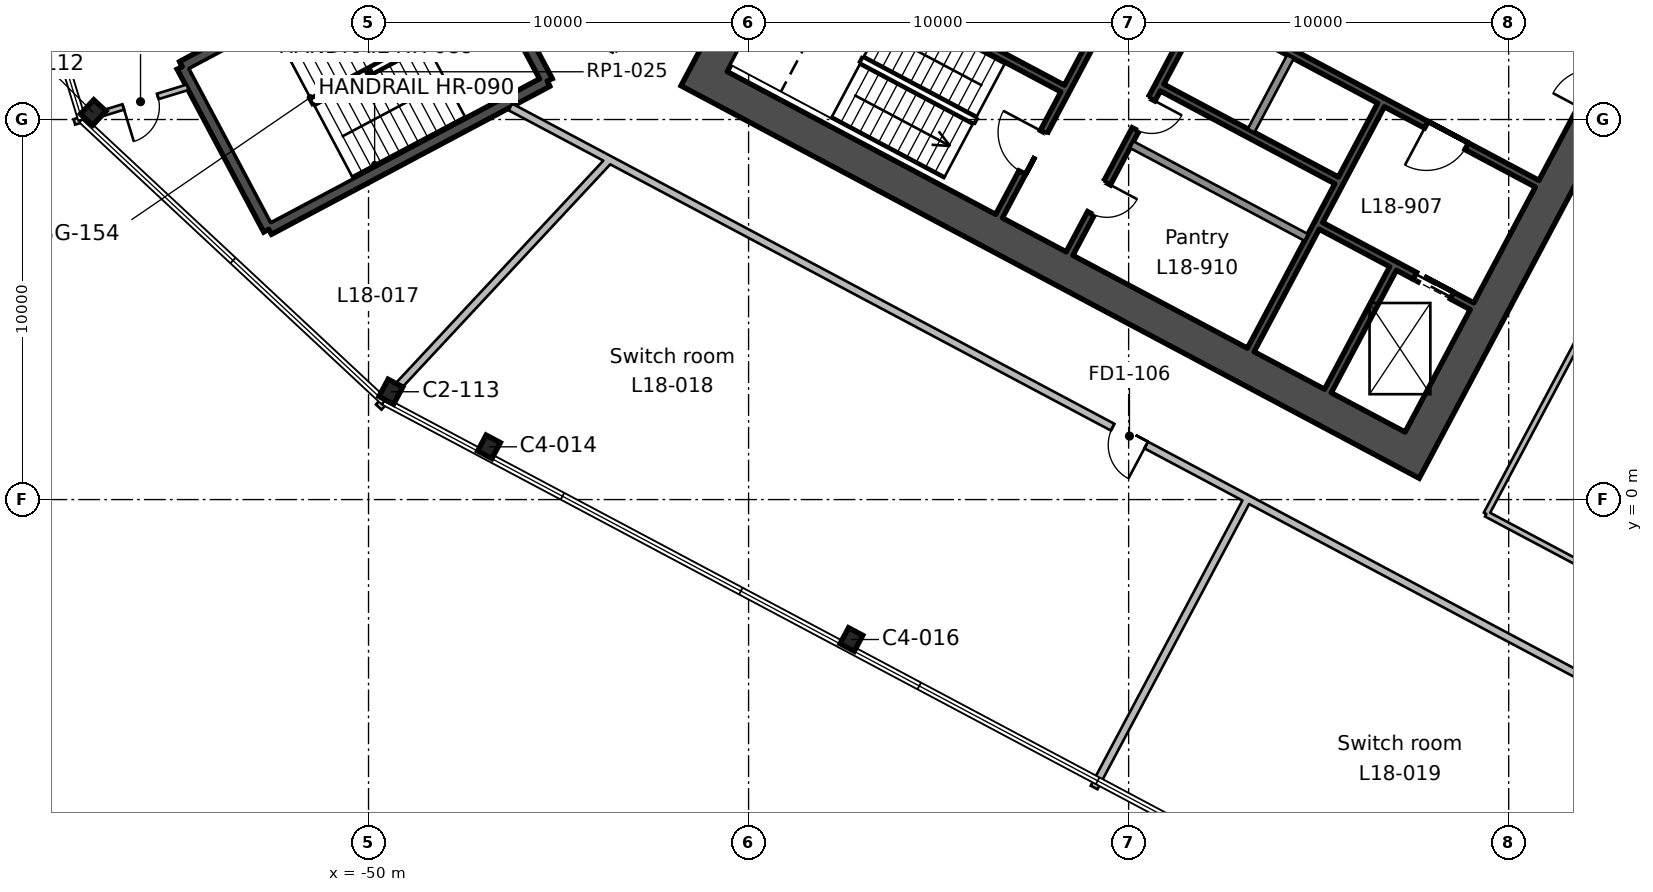
"""IFC4 building model, lengths in metres.
Left out: names, types, materials, properties, quantities, classifications, styles, units other than length and angle.
Written with IfcOpenShell. Run it as: python <this file> out.ifc"""

import sys

from ifc_helpers import new_model, si_unit, direction, frame, frame_2d, origin, origin_2d, place, context, subcontext, project, spatial, rectangle, i_section, extrude, element, fill, save


model = new_model("IFC4")
c1 = context("Model", 3, precision=1e-05, world=origin(), true_north=direction((0.0, 1.0)))
c2 = subcontext(c1, "Body", "Model", "MODEL_VIEW")
j1 = project(units=[si_unit("LENGTHUNIT", "METRE"), si_unit("PLANEANGLEUNIT", "RADIAN")], contexts=[c1])
p1 = place(None, origin())
s1 = spatial("IfcSite", under=j1, at=p1, CompositionType="ELEMENT")
p2 = place(p1, origin())
s2 = spatial("IfcBuilding", under=s1, at=p2, CompositionType="ELEMENT")
p3 = place(p2, frame((0.0, 0.0, 93.8)))
s3 = spatial("IfcBuildingStorey", under=s2, at=p3, CompositionType="ELEMENT", Elevation=93.8)
for number, where, z_axis, x_axis in (
    (1, (-37.294, -3.682, 0.0), (0.0, 0.0, 1.0), (0.883, -0.469, 0.0)),
    (2, (-46.83, 1.388, 0.0), (0.0, 0.0, 1.0), (0.883, -0.469, 0.0)),
):
    element("IfcColumn", number, at=place(p3, frame(where, z_axis=z_axis, x_axis=x_axis)), inside=s3, PredefinedType="COLUMN", context=c2, shape_type="SweptSolid", body=[
        extrude(i_section(OverallWidth=0.424, OverallDepth=0.475, WebThickness=0.048, FlangeThickness=0.077, FilletRadius=0.015, at=origin_2d()), origin(), (0.0, 0.0, 1.0), 4.6),
    ])
for number, where, z_axis, x_axis in (
    (3, (-49.412, 2.837, 0.0), (0.0, 0.0, 1.0), (0.883, -0.469, 0.0)),
    (4, (-57.245, 10.183, 0.0), (0.0, 0.0, 1.0), (0.731, -0.682, 0.0)),
):
    element("IfcColumn", number, at=place(p3, frame(where, z_axis=z_axis, x_axis=x_axis)), inside=s3, PredefinedType="COLUMN", context=c2, shape_type="SweptSolid", body=[
        extrude(i_section(OverallWidth=0.437, OverallDepth=0.513, WebThickness=0.061, FlangeThickness=0.097, FilletRadius=0.015, at=origin_2d()), origin(), (0.0, 0.0, 1.0), 4.6),
    ])
p4 = place(p3, frame((-13.362, 18.43, 0.0), z_axis=(0.0, 0.0, 1.0), x_axis=(-0.46947084998, -0.882947971864, 0.0)))
e5 = element("IfcWall", 5, at=p4, inside=s3, PredefinedType="SHEAR", context=c2, shape_type="SweptSolid", body=[
    extrude(rectangle(XDim=20.0, YDim=0.9, at=frame_2d((10.0, 0.0))), origin(), (0.0, 0.0, 1.0), 4.6),
])
p5 = place(p4, frame((7.0, 0.0, 0.0)))
e6 = element("IfcOpeningElement", 6, at=p5, cuts=e5, PredefinedType="OPENING", context=c2, shape_type="SweptSolid", body=[
    extrude(rectangle(XDim=2.4, YDim=2.4, at=frame_2d((1.2, 1.2))), frame((0.0, 0.46, 0.0), z_axis=(0.0, -1.0, 0.0), x_axis=(1.0, 0.0, 0.0)), (0.0, 0.0, 1.0), 0.92),
])
p6 = place(p3, frame((-31.992, 28.336, 0.0), z_axis=(0.0, 0.0, 1.0), x_axis=(-0.46947084998, -0.882947971864, 0.0)))
e7 = element("IfcWall", 7, at=p6, inside=s3, PredefinedType="SHEAR", context=c2, shape_type="SweptSolid", body=[
    extrude(rectangle(XDim=20.0, YDim=0.9, at=frame_2d((10.0, 0.0))), origin(), (0.0, 0.0, 1.0), 4.6),
])
p7 = place(p6, frame((10.6, 0.0, 0.0)))
e8 = element("IfcOpeningElement", 8, at=p7, cuts=e7, PredefinedType="OPENING", context=c2, shape_type="SweptSolid", body=[
    extrude(rectangle(XDim=2.4, YDim=2.4, at=frame_2d((1.2, 1.2))), frame((0.0, 0.46, 0.0), z_axis=(0.0, -1.0, 0.0), x_axis=(1.0, 0.0, 0.0)), (0.0, 0.0, 1.0), 0.92),
])
p8 = place(p3, frame((-22.937, 1.38, 0.0), z_axis=(0.0, 0.0, 1.0), x_axis=(-0.88295276571, 0.46946183394, 0.0)))
e9 = element("IfcWall", 9, at=p8, inside=s3, PredefinedType="SHEAR", context=c2, shape_type="SweptSolid", body=[
    extrude(rectangle(XDim=20.2, YDim=0.9, at=frame_2d((10.1, 0.0))), origin(), (0.0, 0.0, 1.0), 4.6),
])
p9 = place(p3, frame((-23.043, 6.08, 0.0), z_axis=(0.0, 0.0, 1.0), x_axis=(-0.469494272526, -0.882935517501, 0.0)))
e10 = element("IfcWall", 10, at=p9, inside=s3, PredefinedType="SHEAR", context=c2, shape_type="SweptSolid", body=[
    extrude(rectangle(XDim=3.65, YDim=0.2, at=frame_2d((1.825, 0.0))), origin(), (0.0, 0.0, 1.0), 4.6),
])
p10 = place(p3, frame((-23.36, 10.382, 0.0), z_axis=(0.0, 0.0, 1.0), x_axis=(-0.469480409012, -0.88294288918, 0.0)))
e11 = element("IfcWall", 11, at=p10, inside=s3, PredefinedType="SHEAR", context=c2, shape_type="SweptSolid", body=[
    extrude(rectangle(XDim=7.3, YDim=0.2, at=frame_2d((3.65, 0.0))), origin(), (0.0, 0.0, 1.0), 4.6),
])
p11 = place(p3, frame((-25.744, 11.65, 0.0), z_axis=(0.0, 0.0, 1.0), x_axis=(-0.469487830541, -0.882938942948, 0.0)))
e12 = element("IfcWall", 12, at=p11, inside=s3, PredefinedType="SOLIDWALL", context=c2, shape_type="SweptSolid", body=[
    extrude(rectangle(XDim=2.2, YDim=0.2, at=frame_2d((1.1, 0.0))), origin(), (0.0, 0.0, 1.0), 4.6),
])
p12 = place(p3, frame((-28.128, 12.917, 0.0), z_axis=(0.0, 0.0, 1.0), x_axis=(-0.469454336211, -0.882956752176, 0.0)))
e13 = element("IfcWall", 13, at=p12, inside=s3, PredefinedType="SHEAR", context=c2, shape_type="SweptSolid", body=[
    extrude(rectangle(XDim=7.3, YDim=0.2, at=frame_2d((3.65, 0.0))), origin(), (0.0, 0.0, 1.0), 4.6),
])
p13 = place(p12, frame((2.7, 0.0, 0.0)))
e14 = element("IfcOpeningElement", 14, at=p13, cuts=e13, PredefinedType="OPENING", context=c2, shape_type="SweptSolid", body=[
    extrude(rectangle(XDim=0.9, YDim=2.1, at=frame_2d((0.45, 1.05))), frame((0.0, 0.11, 0.0), z_axis=(0.0, -1.0, 0.0), x_axis=(1.0, 0.0, 0.0)), (0.0, 0.0, 1.0), 0.22),
])
p14 = place(p12, frame((5.2, 0.0, 0.0)))
e15 = element("IfcOpeningElement", 15, at=p14, cuts=e13, PredefinedType="OPENING", context=c2, shape_type="SweptSolid", body=[
    extrude(rectangle(XDim=0.9, YDim=2.1, at=frame_2d((0.45, 1.05))), frame((0.0, 0.11, 0.0), z_axis=(0.0, -1.0, 0.0), x_axis=(1.0, 0.0, 0.0)), (0.0, 0.0, 1.0), 0.22),
])
p15 = place(p3, frame((-29.982, 13.903, 0.0), z_axis=(0.0, 0.0, 1.0), x_axis=(-0.469454336211, -0.882956752176, 0.0)))
e16 = element("IfcWall", 16, at=p15, inside=s3, PredefinedType="SHEAR", context=c2, shape_type="SweptSolid", body=[
    extrude(rectangle(XDim=7.3, YDim=0.2, at=frame_2d((3.65, 0.0))), origin(), (0.0, 0.0, 1.0), 4.6),
])
p16 = place(p15, frame((4.8, 0.0, 0.0)))
e17 = element("IfcOpeningElement", 17, at=p16, cuts=e16, PredefinedType="OPENING", context=c2, shape_type="SweptSolid", body=[
    extrude(rectangle(XDim=1.2, YDim=2.1, at=frame_2d((0.6, 1.05))), frame((0.0, 0.11, 0.0), z_axis=(0.0, -1.0, 0.0), x_axis=(1.0, 0.0, 0.0)), (0.0, 0.0, 1.0), 0.22),
])
p17 = place(p3, frame((-19.252, 8.311, 0.0), z_axis=(0.0, 0.0, 1.0), x_axis=(-0.882955722218, 0.469456273365, 0.0)))
e18 = element("IfcWall", 18, at=p17, inside=s3, PredefinedType="SHEAR", context=c2, shape_type="SweptSolid", body=[
    extrude(rectangle(XDim=10.0, YDim=0.2, at=frame_2d((5.0, 0.0))), origin(), (0.0, 0.0, 1.0), 4.6),
])
p18 = place(p17, frame((2.1, 0.0, 0.0)))
e19 = element("IfcOpeningElement", 19, at=p18, cuts=e18, PredefinedType="OPENING", context=c2, shape_type="SweptSolid", body=[
    extrude(rectangle(XDim=1.2, YDim=2.1, at=frame_2d((0.6, 1.05))), frame((0.0, 0.11, 0.0), z_axis=(0.0, -1.0, 0.0), x_axis=(1.0, 0.0, 0.0)), (0.0, 0.0, 1.0), 0.22),
])
p19 = place(p3, frame((-24.528, 8.398, 0.0), z_axis=(0.0, 0.0, 1.0), x_axis=(-0.882953967957, 0.469459572775, 0.0)))
e20 = element("IfcWall", 20, at=p19, inside=s3, PredefinedType="SHEAR", context=c2, shape_type="SweptSolid", body=[
    extrude(rectangle(XDim=5.2, YDim=0.2, at=frame_2d((2.6, 0.0))), origin(), (0.0, 0.0, 1.0), 4.6),
])
p20 = place(p3, frame((-20.965, 5.088, 0.0), z_axis=(0.0, 0.0, 1.0), x_axis=(-0.882925986334, 0.469512196493, 0.0)))
e21 = element("IfcWall", 21, at=p20, inside=s3, PredefinedType="SHEAR", context=c2, shape_type="SweptSolid", body=[
    extrude(rectangle(XDim=4.5, YDim=0.2, at=frame_2d((2.25, 0.0))), origin(), (0.0, 0.0, 1.0), 4.6),
])
p21 = place(p20, frame((0.6, 0.0, 0.0)))
e22 = element("IfcOpeningElement", 22, at=p21, cuts=e21, PredefinedType="OPENING", context=c2, shape_type="SweptSolid", body=[
    extrude(rectangle(XDim=1.1, YDim=2.1, at=frame_2d((0.55, 1.05))), frame((0.0, 0.11, 0.0), z_axis=(0.0, -1.0, 0.0), x_axis=(1.0, 0.0, 0.0)), (0.0, 0.0, 1.0), 0.22),
])
p22 = place(p3, frame((-31.737, 10.816, 0.0), z_axis=(0.0, 0.0, 1.0), x_axis=(-0.882940221191, 0.469485426614, 0.0)))
e23 = element("IfcWall", 23, at=p22, inside=s3, PredefinedType="SHEAR", context=c2, shape_type="SweptSolid", body=[
    extrude(rectangle(XDim=8.0, YDim=0.2, at=frame_2d((4.0, 0.0))), origin(), (0.0, 0.0, 1.0), 4.6),
])
p23 = place(p3, frame((-25.326, 6.897, 0.0), z_axis=(0.0, 0.0, 1.0), x_axis=(-0.882953967957, 0.469459572775, 0.0)))
e24 = element("IfcWall", 24, at=p23, inside=s3, PredefinedType="SOLIDWALL", context=c2, shape_type="SweptSolid", body=[
    extrude(rectangle(XDim=5.2, YDim=0.2, at=frame_2d((2.6, 0.0))), origin(), (0.0, 0.0, 1.0), 4.6),
])
p24 = place(p3, frame((-47.574, 15.29, 0.0), z_axis=(0.0, 0.0, 1.0), x_axis=(0.469443498566, -0.882962514297, 0.0)))
e25 = element("IfcWall", 25, at=p24, inside=s3, PredefinedType="SHEAR", context=c2, shape_type="SweptSolid", body=[
    extrude(rectangle(XDim=4.85, YDim=0.3, at=frame_2d((2.425, 0.0))), origin(), (0.0, 0.0, 1.0), 4.6),
])
p25 = place(p3, frame((-45.297, 11.007, 0.0), z_axis=(0.0, 0.0, 1.0), x_axis=(-0.882951519127, -0.469464178475, 0.0)))
e26 = element("IfcWall", 26, at=p25, inside=s3, PredefinedType="SHEAR", context=c2, shape_type="SweptSolid", body=[
    extrude(rectangle(XDim=8.3, YDim=0.3, at=frame_2d((4.15, 0.0))), origin(), (0.0, 0.0, 1.0), 4.6),
])
p26 = place(p3, frame((-52.626, 7.111, 0.0), z_axis=(0.0, 0.0, 1.0), x_axis=(-0.469464364128, 0.882951420416, 0.0)))
e27 = element("IfcWall", 27, at=p26, inside=s3, PredefinedType="SHEAR", context=c2, shape_type="SweptSolid", body=[
    extrude(rectangle(XDim=4.85, YDim=0.3, at=frame_2d((2.425, 0.0))), origin(), (0.0, 0.0, 1.0), 4.6),
])
p27 = place(p3, frame((-54.903, 11.393, 0.0), z_axis=(0.0, 0.0, 1.0), x_axis=(0.882939326045, 0.469487110071, 0.0)))
e28 = element("IfcWall", 28, at=p27, inside=s3, PredefinedType="SHEAR", context=c2, shape_type="SweptSolid", body=[
    extrude(rectangle(XDim=8.3, YDim=0.3, at=frame_2d((4.15, 0.0))), origin(), (0.0, 0.0, 1.0), 4.6),
])
p28 = place(p27, frame((6.05, 0.0, 0.0)))
e29 = element("IfcOpeningElement", 29, at=p28, cuts=e28, PredefinedType="OPENING", context=c2, shape_type="SweptSolid", body=[
    extrude(rectangle(XDim=1.9, YDim=2.1, at=frame_2d((0.95, 1.05))), frame((0.0, 0.16, 0.0), z_axis=(0.0, -1.0, 0.0), x_axis=(1.0, 0.0, 0.0)), (0.0, 0.0, 1.0), 0.32),
])
p29 = place(p3, frame((-54.761, 10.848, 0.0), z_axis=(0.0, 0.0, 1.0), x_axis=(-0.956301064033, -0.29238378021, 0.0)))
e30 = element("IfcWall", 30, at=p29, inside=s3, PredefinedType="PARTITIONING", context=c2, shape_type="SweptSolid", body=[
    extrude(rectangle(XDim=3.115, YDim=0.15, at=frame_2d((1.558, 0.0))), origin(), (0.0, 0.0, 1.0), 4.2),
])
p30 = place(p29, frame((0.82, 0.0, 0.0)))
e31 = element("IfcOpeningElement", 31, at=p30, cuts=e30, PredefinedType="OPENING", context=c2, shape_type="SweptSolid", body=[
    extrude(rectangle(XDim=0.95, YDim=2.1, at=frame_2d((0.475, 1.05))), frame((0.0, 0.085, 0.0), z_axis=(0.0, -1.0, 0.0), x_axis=(1.0, 0.0, 0.0)), (0.0, 0.0, 1.0), 0.17),
])
p31 = place(p3, frame((-43.661, 8.944, 0.0), z_axis=(0.0, 0.0, 1.0), x_axis=(-0.682024103878, -0.731329694276, 0.0)))
e32 = element("IfcWall", 32, at=p31, inside=s3, PredefinedType="PARTITIONING", context=c2, shape_type="SweptSolid", body=[
    extrude(rectangle(XDim=8.903, YDim=0.2, at=frame_2d((4.451, 0.0))), origin(), (0.0, 0.0, 1.0), 4.2),
])
p32 = place(p3, frame((-26.871, 0.017, 0.0), z_axis=(0.0, 0.0, 1.0), x_axis=(-0.469522575087, -0.882920467247, 0.0)))
e33 = element("IfcWall", 33, at=p32, inside=s3, PredefinedType="PARTITIONING", context=c2, shape_type="SweptSolid", body=[
    extrude(rectangle(XDim=8.6, YDim=0.2, at=frame_2d((4.3, 0.0))), origin(), (0.0, 0.0, 1.0), 4.2),
])
p33 = place(p3, frame((-43.544, 11.827, 0.0), z_axis=(0.0, 0.0, 1.0), x_axis=(-0.88289413979, 0.469572079584, 0.0)))
e34 = element("IfcWall", 34, at=p33, inside=s3, PredefinedType="PARTITIONING", context=c2, shape_type="SweptSolid", body=[
    extrude(rectangle(XDim=3.168, YDim=0.15, at=frame_2d((1.584, 0.0))), origin(), (0.0, 0.0, 1.0), 4.2),
])
p34 = place(p3, frame((-13.6, -7.039, 0.0), z_axis=(0.0, 0.0, 1.0), x_axis=(-0.882948807105, 0.469469279113, 0.0)))
e35 = element("IfcWall", 35, at=p34, inside=s3, PredefinedType="PARTITIONING", context=c2, shape_type="SweptSolid", body=[
    extrude(rectangle(XDim=36.999, YDim=0.2, at=frame_2d((18.499, 0.0))), origin(), (0.0, 0.0, 1.0), 4.2),
])
p35 = place(p34, frame((18.05, 0.0, 0.0)))
e36 = element("IfcOpeningElement", 36, at=p35, cuts=e35, PredefinedType="OPENING", context=c2, shape_type="SweptSolid", body=[
    extrude(rectangle(XDim=1.0, YDim=2.1, at=frame_2d((0.5, 1.05))), frame((0.0, 0.11, 0.0), z_axis=(0.0, -1.0, 0.0), x_axis=(1.0, 0.0, 0.0)), (0.0, 0.0, 1.0), 0.22),
])
p36 = place(p3, frame((-20.588, -0.379, 0.0), z_axis=(0.0, 0.0, 1.0), x_axis=(0.469489882812, 0.882937851685, 0.0)))
e37 = element("IfcWall", 37, at=p36, inside=s3, PredefinedType="PARTITIONING", context=c2, shape_type="SweptSolid", body=[
    extrude(rectangle(XDim=20.0, YDim=0.15, at=frame_2d((10.0, 0.0))), origin(), (0.0, 0.0, 1.0), 4.2),
])
p37 = place(p36, frame((9.55, 0.0, 0.0)))
e38 = element("IfcOpeningElement", 38, at=p37, cuts=e37, PredefinedType="OPENING", context=c2, shape_type="SweptSolid", body=[
    extrude(rectangle(XDim=1.0, YDim=2.1, at=frame_2d((0.5, 1.05))), frame((0.0, 0.085, 0.0), z_axis=(0.0, -1.0, 0.0), x_axis=(1.0, 0.0, 0.0)), (0.0, 0.0, 1.0), 0.17),
])
p38 = place(p3, frame((-13.6, -4.094, 0.0), z_axis=(0.0, 0.0, 1.0), x_axis=(-0.882967890474, 0.469433386533, 0.0)))
e39 = element("IfcWall", 39, at=p38, inside=s3, PredefinedType="PARTITIONING", context=c2, shape_type="SweptSolid", body=[
    extrude(rectangle(XDim=7.914, YDim=0.15, at=frame_2d((3.957, 0.0))), origin(), (0.0, 0.0, 1.0), 4.2),
])
p39 = place(p18, origin())
e40 = element("IfcDoor", 40, at=p39, inside=s3, OperationType="SINGLE_SWING_RIGHT", PredefinedType="DOOR", context=c2, shape_type="SweptSolid", body=[
    extrude(rectangle(XDim=1.2, YDim=2.1, at=frame_2d((0.6, 1.05))), frame((0.0, 0.025, 0.0), z_axis=(0.0, -1.0, 0.0), x_axis=(1.0, 0.0, 0.0)), (0.0, 0.0, 1.0), 0.05),
])
fill(e19, e40)
p40 = place(p16, frame((1.2, 0.0, 0.0), z_axis=(0.0, 0.0, 1.0), x_axis=(-1.0, 0.0, 0.0)))
e41 = element("IfcDoor", 41, at=p40, inside=s3, OperationType="SINGLE_SWING_RIGHT", PredefinedType="DOOR", context=c2, shape_type="SweptSolid", body=[
    extrude(rectangle(XDim=1.2, YDim=2.1, at=frame_2d((0.6, 1.05))), frame((0.0, 0.025, 0.0), z_axis=(0.0, -1.0, 0.0), x_axis=(1.0, 0.0, 0.0)), (0.0, 0.0, 1.0), 0.05),
])
fill(e17, e41)
p41 = place(p21, origin())
e42 = element("IfcDoor", 42, at=p41, inside=s3, OperationType="DOUBLE_DOOR_SLIDING", PredefinedType="DOOR", context=c2, shape_type="SweptSolid", body=[
    extrude(rectangle(XDim=1.1, YDim=2.1, at=frame_2d((0.55, 1.05))), frame((0.0, 0.025, 0.0), z_axis=(0.0, -1.0, 0.0), x_axis=(1.0, 0.0, 0.0)), (0.0, 0.0, 1.0), 0.05),
])
fill(e22, e42)
p42 = place(p13, origin())
e43 = element("IfcDoor", 43, at=p42, inside=s3, OperationType="SINGLE_SWING_LEFT", PredefinedType="DOOR", context=c2, shape_type="SweptSolid", body=[
    extrude(rectangle(XDim=0.9, YDim=2.1, at=frame_2d((0.45, 1.05))), frame((0.0, 0.025, 0.0), z_axis=(0.0, -1.0, 0.0), x_axis=(1.0, 0.0, 0.0)), (0.0, 0.0, 1.0), 0.05),
])
fill(e14, e43)
p43 = place(p14, origin())
e44 = element("IfcDoor", 44, at=p43, inside=s3, OperationType="SINGLE_SWING_LEFT", PredefinedType="DOOR", context=c2, shape_type="SweptSolid", body=[
    extrude(rectangle(XDim=0.9, YDim=2.1, at=frame_2d((0.45, 1.05))), frame((0.0, 0.025, 0.0), z_axis=(0.0, -1.0, 0.0), x_axis=(1.0, 0.0, 0.0)), (0.0, 0.0, 1.0), 0.05),
])
fill(e15, e44)
p44 = place(p30, origin())
e45 = element("IfcDoor", 45, at=p44, inside=s3, OperationType="SINGLE_SWING_RIGHT", PredefinedType="DOOR", context=c2, shape_type="SweptSolid", body=[
    extrude(rectangle(XDim=0.95, YDim=2.1, at=frame_2d((0.475, 1.05))), frame((0.0, 0.025, 0.0), z_axis=(0.0, -1.0, 0.0), x_axis=(1.0, 0.0, 0.0)), (0.0, 0.0, 1.0), 0.05),
])
fill(e31, e45)
p45 = place(p35, origin())
e46 = element("IfcDoor", 46, at=p45, inside=s3, OperationType="SINGLE_SWING_LEFT", PredefinedType="DOOR", context=c2, shape_type="SweptSolid", body=[
    extrude(rectangle(XDim=1.0, YDim=2.1, at=frame_2d((0.5, 1.05))), frame((0.0, 0.025, 0.0), z_axis=(0.0, -1.0, 0.0), x_axis=(1.0, 0.0, 0.0)), (0.0, 0.0, 1.0), 0.05),
])
fill(e36, e46)
save(model, sys.argv[1])
